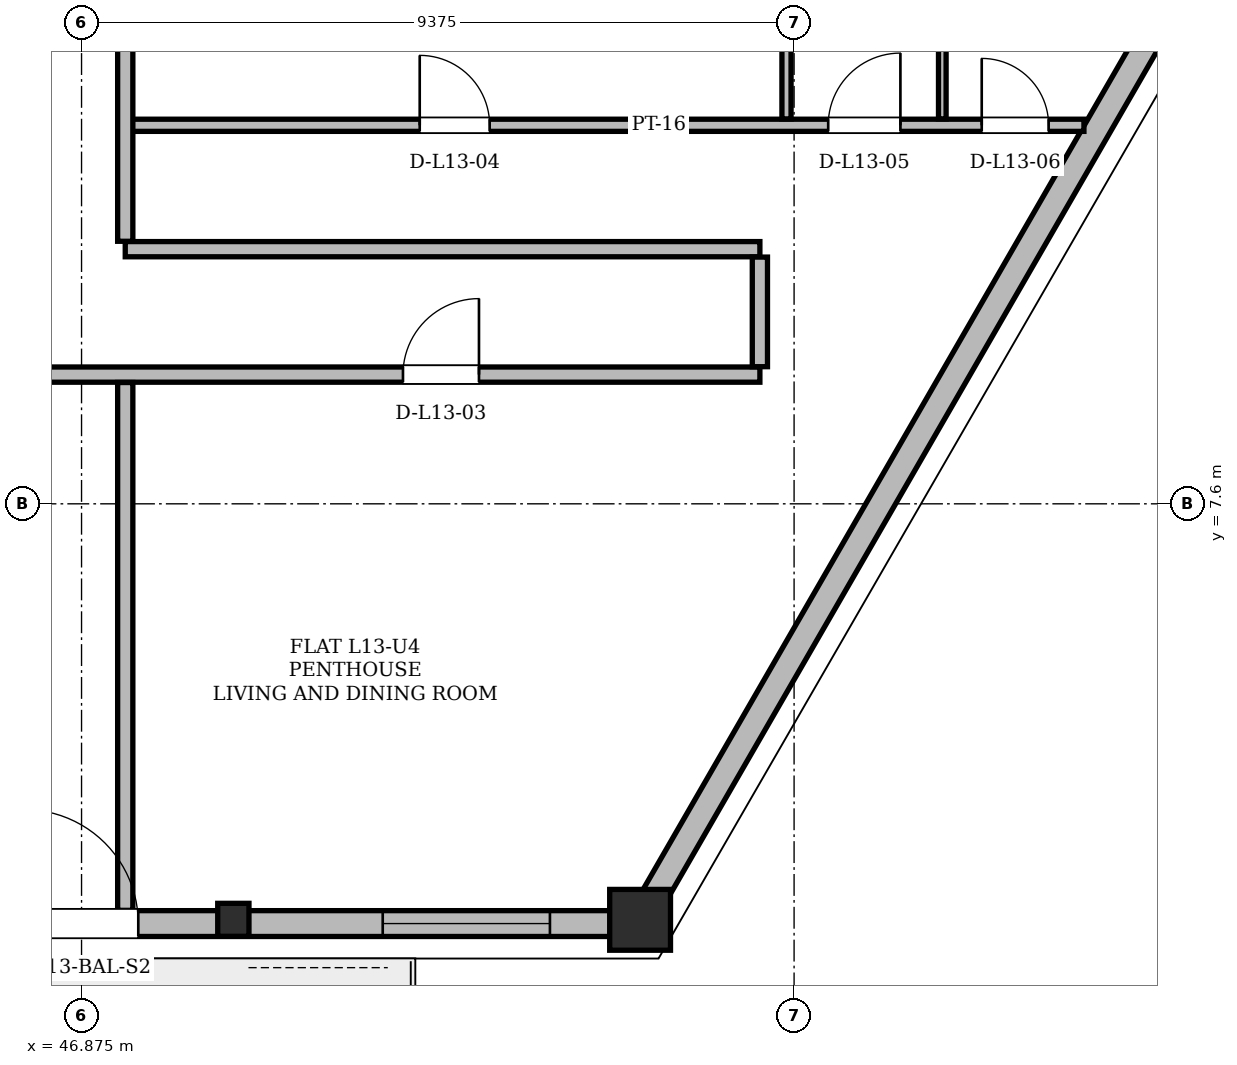
"""IFC4 building model, lengths in metres.
Left out: names, types, materials, properties, quantities, classifications, styles, units other than length and angle.
Written with IfcOpenShell. Run it as: python <this file> out.ifc"""

import sys

from ifc_helpers import new_model, si_unit, direction, frame, frame_2d, origin, origin_2d, place, context, subcontext, project, spatial, rectangle, hollow_rectangle, i_section, extrude, element, fill, save


model = new_model("IFC4")
c1 = context("Model", 3, precision=1e-05, world=origin(), true_north=direction((0.0, 1.0)))
c2 = subcontext(c1, "Body", "Model", "MODEL_VIEW")
j1 = project(units=[si_unit("LENGTHUNIT", "METRE"), si_unit("PLANEANGLEUNIT", "RADIAN")], contexts=[c1])
p1 = place(None, origin())
s1 = spatial("IfcSite", under=j1, at=p1, CompositionType="ELEMENT")
p2 = place(p1, origin())
s2 = spatial("IfcBuilding", under=s1, at=p2, CompositionType="ELEMENT")
p3 = place(p2, frame((0.0, 0.0, 52.5)))
s3 = spatial("IfcBuildingStorey", under=s2, at=p3, CompositionType="ELEMENT", Elevation=52.5)
p4 = place(p3, frame((54.201, 2.078, 0.004), z_axis=(0.012775429371, 0.027453582266, 0.999541439474), x_axis=(-0.906641267755, 0.421902372124, 0.0)))
e1 = element("IfcColumn", 1, at=p4, inside=s3, PredefinedType="COLUMN", context=c2, shape_type="SweptSolid", body=[
    extrude(hollow_rectangle(XDim=0.8, YDim=0.8, WallThickness=0.065, at=origin_2d()), origin(), (0.0, 0.0, 1.0), 3.593),
])
p5 = place(p3, frame((48.857, 2.078, 0.004), z_axis=(0.008698545481, 0.027454784174, 0.999585199036), x_axis=(-0.95329693993, 0.302034674037, 0.0)))
e2 = element("IfcColumn", 2, at=p5, inside=s3, PredefinedType="COLUMN", context=c2, shape_type="SweptSolid", body=[
    extrude(i_section(OverallWidth=0.411, OverallDepth=0.434, WebThickness=0.036, FlangeThickness=0.057, at=origin_2d()), origin(), (0.0, 0.0, 1.0), 3.593),
])
p6 = place(p3, frame((20.799, 2.078, 0.0), z_axis=(0.0, 0.0, 1.0), x_axis=(1.0, 0.0, 0.0)))
e3 = element("IfcWall", 3, at=p6, inside=s3, PredefinedType="SOLIDWALL", context=c2, shape_type="SweptSolid", body=[
    extrude(rectangle(XDim=33.402, YDim=0.34, at=frame_2d((16.701, 0.0))), origin(), (0.0, 0.0, 1.0), 2.494),
])
p7 = place(p6, frame((7.615, 0.0, 0.0)))
e4 = element("IfcOpeningElement", 4, at=p7, cuts=e3, PredefinedType="OPENING", context=c2, shape_type="SweptSolid", body=[
    extrude(rectangle(XDim=1.5, YDim=2.2, at=frame_2d((0.75, 1.1))), frame((0.0, 0.17, 0.0), z_axis=(0.0, -1.0, 0.0), x_axis=(1.0, 0.0, 0.0)), (0.0, 0.0, 1.0), 0.34),
])
p8 = place(p6, frame((25.323, 0.0, 0.0)))
e5 = element("IfcOpeningElement", 5, at=p8, cuts=e3, PredefinedType="OPENING", context=c2, shape_type="SweptSolid", body=[
    extrude(rectangle(XDim=1.5, YDim=2.2, at=frame_2d((0.75, 1.1))), frame((0.0, 0.17, 0.0), z_axis=(0.0, -1.0, 0.0), x_axis=(1.0, 0.0, 0.0)), (0.0, 0.0, 1.0), 0.34),
])
p9 = place(p6, frame((1.988, 0.0, 0.85)))
e6 = element("IfcOpeningElement", 6, at=p9, cuts=e3, PredefinedType="OPENING", context=c2, shape_type="SweptSolid", body=[
    extrude(rectangle(XDim=2.2, YDim=1.534, at=frame_2d((1.1, 0.767))), frame((0.0, 0.17, 0.0), z_axis=(0.0, -1.0, 0.0), x_axis=(1.0, 0.0, 0.0)), (0.0, 0.0, 1.0), 0.34),
])
p10 = place(p6, frame((12.577, 0.0, 0.85)))
e7 = element("IfcOpeningElement", 7, at=p10, cuts=e3, PredefinedType="OPENING", context=c2, shape_type="SweptSolid", body=[
    extrude(rectangle(XDim=1.6, YDim=1.534, at=frame_2d((0.8, 0.767))), frame((0.0, 0.17, 0.0), z_axis=(0.0, -1.0, 0.0), x_axis=(1.0, 0.0, 0.0)), (0.0, 0.0, 1.0), 0.34),
])
p11 = place(p6, frame((19.332, 0.0, 0.85)))
e8 = element("IfcOpeningElement", 8, at=p11, cuts=e3, PredefinedType="OPENING", context=c2, shape_type="SweptSolid", body=[
    extrude(rectangle(XDim=1.8, YDim=1.534, at=frame_2d((0.9, 0.767))), frame((0.0, 0.17, 0.0), z_axis=(0.0, -1.0, 0.0), x_axis=(1.0, 0.0, 0.0)), (0.0, 0.0, 1.0), 0.34),
])
p12 = place(p6, frame((30.039, 0.0, 0.85)))
e9 = element("IfcOpeningElement", 9, at=p12, cuts=e3, PredefinedType="OPENING", context=c2, shape_type="SweptSolid", body=[
    extrude(rectangle(XDim=2.2, YDim=1.534, at=frame_2d((1.1, 0.767))), frame((0.0, 0.17, 0.0), z_axis=(0.0, -1.0, 0.0), x_axis=(1.0, 0.0, 0.0)), (0.0, 0.0, 1.0), 0.34),
])
p13 = place(p3, frame((54.201, 2.078, 0.0), z_axis=(0.0, 0.0, 1.0), x_axis=(0.49999957979, 0.866025646392, 0.0)))
e10 = element("IfcWall", 10, at=p13, inside=s3, PredefinedType="SOLIDWALL", context=c2, shape_type="SweptSolid", body=[
    extrude(rectangle(XDim=14.515, YDim=0.34, at=frame_2d((7.257, 0.0))), origin(), (0.0, 0.0, 1.0), 2.494),
])
p14 = place(p3, frame((19.2, 9.3, 0.0), z_axis=(0.0, 0.0, 1.0), x_axis=(1.0, 0.0, 0.0)))
e11 = element("IfcWall", 11, at=p14, inside=s3, PredefinedType="PARTITIONING", context=c2, shape_type="SweptSolid", body=[
    extrude(rectangle(XDim=36.6, YDim=0.2, at=frame_2d((18.3, 0.0))), origin(), (0.0, 0.0, 1.0), 2.738),
])
p15 = place(p14, frame((8.531, 0.0, 0.0)))
e12 = element("IfcOpeningElement", 12, at=p15, cuts=e11, PredefinedType="OPENING", context=c2, shape_type="SweptSolid", body=[
    extrude(rectangle(XDim=1.0, YDim=2.18, at=frame_2d((0.5, 1.09))), frame((0.0, 0.1, 0.0), z_axis=(0.0, -1.0, 0.0), x_axis=(1.0, 0.0, 0.0)), (0.0, 0.0, 1.0), 0.2),
])
p16 = place(p14, frame((24.062, 0.0, 0.0)))
e13 = element("IfcOpeningElement", 13, at=p16, cuts=e11, PredefinedType="OPENING", context=c2, shape_type="SweptSolid", body=[
    extrude(rectangle(XDim=1.0, YDim=2.18, at=frame_2d((0.5, 1.09))), frame((0.0, 0.1, 0.0), z_axis=(0.0, -1.0, 0.0), x_axis=(1.0, 0.0, 0.0)), (0.0, 0.0, 1.0), 0.2),
])
p17 = place(p14, frame((31.904, 0.0, 0.0)))
e14 = element("IfcOpeningElement", 14, at=p17, cuts=e11, PredefinedType="OPENING", context=c2, shape_type="SweptSolid", body=[
    extrude(rectangle(XDim=1.0, YDim=2.18, at=frame_2d((0.5, 1.09))), frame((0.0, 0.1, 0.0), z_axis=(0.0, -1.0, 0.0), x_axis=(1.0, 0.0, 0.0)), (0.0, 0.0, 1.0), 0.2),
])
p18 = place(p3, frame((47.45, 10.95, 0.0), z_axis=(0.0, 0.0, 1.0), x_axis=(1.0, 0.0, 0.0)))
e15 = element("IfcWall", 15, at=p18, inside=s3, PredefinedType="PARTITIONING", context=c2, shape_type="SweptSolid", body=[
    extrude(rectangle(XDim=8.35, YDim=0.2, at=frame_2d((4.175, 0.0))), origin(), (0.0, 0.0, 1.0), 3.36),
])
p19 = place(p3, frame((47.4, 12.58, 0.0), z_axis=(0.0, 0.0, 1.0), x_axis=(1.0, 0.0, 0.0)))
e16 = element("IfcWall", 16, at=p19, inside=s3, PredefinedType="PARTITIONING", context=c2, shape_type="SweptSolid", body=[
    extrude(rectangle(XDim=12.664, YDim=0.16, at=frame_2d((6.332, 0.0))), origin(), (0.0, 0.0, 1.0), 2.738),
])
p20 = place(p19, frame((3.924, 0.0, 0.0)))
e17 = element("IfcOpeningElement", 17, at=p20, cuts=e16, PredefinedType="OPENING", context=c2, shape_type="SweptSolid", body=[
    extrude(rectangle(XDim=0.92, YDim=2.12, at=frame_2d((0.46, 1.06))), frame((0.0, 0.08, 0.0), z_axis=(0.0, -1.0, 0.0), x_axis=(1.0, 0.0, 0.0)), (0.0, 0.0, 1.0), 0.16),
])
p21 = place(p19, frame((9.299, 0.0, 0.0)))
e18 = element("IfcOpeningElement", 18, at=p21, cuts=e16, PredefinedType="OPENING", context=c2, shape_type="SweptSolid", body=[
    extrude(rectangle(XDim=0.95, YDim=2.1, at=frame_2d((0.475, 1.05))), frame((0.0, 0.08, 0.0), z_axis=(0.0, -1.0, 0.0), x_axis=(1.0, 0.0, 0.0)), (0.0, 0.0, 1.0), 0.16),
])
p22 = place(p19, frame((11.319, 0.0, 0.0)))
e19 = element("IfcOpeningElement", 19, at=p22, cuts=e16, PredefinedType="OPENING", context=c2, shape_type="SweptSolid", body=[
    extrude(rectangle(XDim=0.88, YDim=2.08, at=frame_2d((0.44, 1.04))), frame((0.0, 0.08, 0.0), z_axis=(0.0, -1.0, 0.0), x_axis=(1.0, 0.0, 0.0)), (0.0, 0.0, 1.0), 0.16),
])
p23 = place(p3, frame((47.45, 2.252, 0.0), z_axis=(0.0, 0.0, 1.0), x_axis=(0.0, 1.0, 0.0)))
e20 = element("IfcWall", 20, at=p23, inside=s3, PredefinedType="PARTITIONING", context=c2, shape_type="SweptSolid", body=[
    extrude(rectangle(XDim=6.944, YDim=0.2, at=frame_2d((3.472, 0.0))), origin(), (0.0, 0.0, 1.0), 2.738),
])
p24 = place(p3, frame((47.45, 11.054, 0.0), z_axis=(0.0, 0.0, 1.0), x_axis=(0.0, 1.0, 0.0)))
e21 = element("IfcWall", 21, at=p24, inside=s3, PredefinedType="PARTITIONING", context=c2, shape_type="SweptSolid", body=[
    extrude(rectangle(XDim=27.509, YDim=0.2, at=frame_2d((13.754, 0.0))), origin(), (0.0, 0.0, 1.0), 2.494),
])
p25 = place(p24, frame((10.989, 0.0, 0.0)))
e22 = element("IfcOpeningElement", 22, at=p25, cuts=e21, PredefinedType="OPENING", context=c2, shape_type="SweptSolid", body=[
    extrude(rectangle(XDim=1.0, YDim=2.18, at=frame_2d((0.5, 1.09))), frame((0.0, 0.1, 0.0), z_axis=(0.0, -1.0, 0.0), x_axis=(1.0, 0.0, 0.0)), (0.0, 0.0, 1.0), 0.2),
])
p26 = place(p3, frame((55.8, 9.404, 0.0), z_axis=(0.0, 0.0, 1.0), x_axis=(0.0, 1.0, 0.0)))
e23 = element("IfcWall", 23, at=p26, inside=s3, PredefinedType="PARTITIONING", context=c2, shape_type="SweptSolid", body=[
    extrude(rectangle(XDim=1.442, YDim=0.2, at=frame_2d((0.721, 0.0))), origin(), (0.0, 0.0, 1.0), 3.36),
])
p27 = place(p3, frame((56.15, 12.664, 0.0), z_axis=(0.0, 0.0, 1.0), x_axis=(0.0, 1.0, 0.0)))
e24 = element("IfcWall", 24, at=p27, inside=s3, PredefinedType="PARTITIONING", context=c2, shape_type="SweptSolid", body=[
    extrude(rectangle(XDim=3.832, YDim=0.12, at=frame_2d((1.916, 0.0))), origin(), (0.0, 0.0, 1.0), 2.738),
])
p28 = place(p3, frame((58.2, 12.664, 0.0), z_axis=(0.0, 0.0, 1.0), x_axis=(0.0, 1.0, 0.0)))
e25 = element("IfcWall", 25, at=p28, inside=s3, PredefinedType="PARTITIONING", context=c2, shape_type="SweptSolid", body=[
    extrude(rectangle(XDim=3.832, YDim=0.1, at=frame_2d((1.916, 0.0))), origin(), (0.0, 0.0, 1.0), 2.738),
])
p29 = place(p8, origin())
e26 = element("IfcDoor", 26, at=p29, inside=s3, OperationType="SINGLE_SWING_LEFT", PredefinedType="DOOR", context=c2, shape_type="SweptSolid", body=[
    extrude(rectangle(XDim=1.5, YDim=2.2, at=frame_2d((0.75, 1.1))), frame((0.0, 0.025, 0.0), z_axis=(0.0, -1.0, 0.0), x_axis=(1.0, 0.0, 0.0)), (0.0, 0.0, 1.0), 0.05),
])
fill(e5, e26)
p30 = place(p12, origin())
e27 = element("IfcWindow", 27, at=p30, inside=s3, PartitioningType="SINGLE_PANEL", PredefinedType="WINDOW", context=c2, shape_type="SweptSolid", body=[
    extrude(rectangle(XDim=2.2, YDim=1.534, at=frame_2d((1.1, 0.767))), frame((0.0, 0.03, 0.0), z_axis=(0.0, -1.0, 0.0), x_axis=(1.0, 0.0, 0.0)), (0.0, 0.0, 1.0), 0.06),
])
fill(e9, e27)
p31 = place(p17, origin())
e28 = element("IfcDoor", 28, at=p31, inside=s3, OperationType="SINGLE_SWING_RIGHT", PredefinedType="DOOR", context=c2, shape_type="SweptSolid", body=[
    extrude(rectangle(XDim=1.0, YDim=2.18, at=frame_2d((0.5, 1.09))), frame((0.0, 0.025, 0.0), z_axis=(0.0, -1.0, 0.0), x_axis=(1.0, 0.0, 0.0)), (0.0, 0.0, 1.0), 0.05),
])
fill(e14, e28)
p32 = place(p20, origin())
e29 = element("IfcDoor", 29, at=p32, inside=s3, OperationType="SINGLE_SWING_LEFT", PredefinedType="DOOR", context=c2, shape_type="SweptSolid", body=[
    extrude(rectangle(XDim=0.92, YDim=2.12, at=frame_2d((0.46, 1.06))), frame((0.0, 0.025, 0.0), z_axis=(0.0, -1.0, 0.0), x_axis=(1.0, 0.0, 0.0)), (0.0, 0.0, 1.0), 0.05),
])
fill(e17, e29)
p33 = place(p21, origin())
e30 = element("IfcDoor", 30, at=p33, inside=s3, OperationType="SINGLE_SWING_RIGHT", PredefinedType="DOOR", context=c2, shape_type="SweptSolid", body=[
    extrude(rectangle(XDim=0.95, YDim=2.1, at=frame_2d((0.475, 1.05))), frame((0.0, 0.025, 0.0), z_axis=(0.0, -1.0, 0.0), x_axis=(1.0, 0.0, 0.0)), (0.0, 0.0, 1.0), 0.05),
])
fill(e18, e30)
p34 = place(p22, origin())
e31 = element("IfcDoor", 31, at=p34, inside=s3, OperationType="SINGLE_SWING_LEFT", PredefinedType="DOOR", context=c2, shape_type="SweptSolid", body=[
    extrude(rectangle(XDim=0.88, YDim=2.08, at=frame_2d((0.44, 1.04))), frame((0.0, 0.025, 0.0), z_axis=(0.0, -1.0, 0.0), x_axis=(1.0, 0.0, 0.0)), (0.0, 0.0, 1.0), 0.05),
])
fill(e19, e31)
save(model, sys.argv[1])
